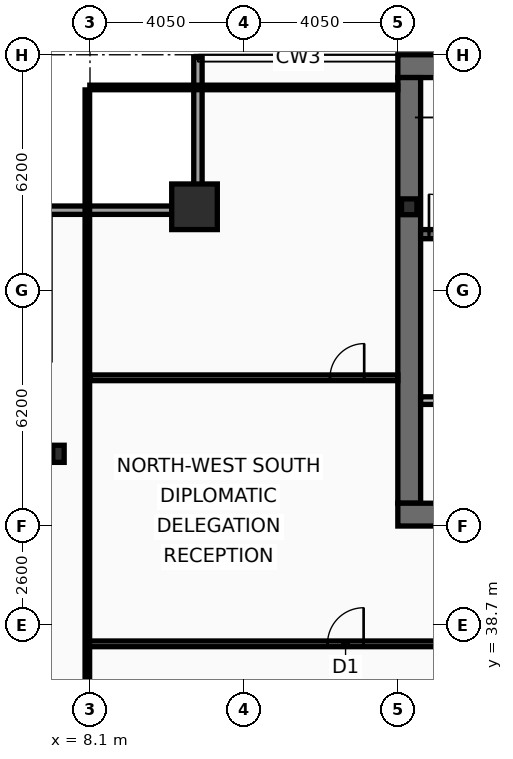
"""IFC4 building model, lengths in metres.
Left out: names, types, materials, properties, quantities, classifications, styles, units other than length and angle.
Written with IfcOpenShell. Run it as: python <this file> out.ifc"""

import sys

from ifc_helpers import new_model, si_unit, direction, frame, frame_2d, origin, origin_2d, place, context, subcontext, project, spatial, rectangle, hollow_rectangle, i_section, extrude, element, fill, save


model = new_model("IFC4")
c1 = context("Model", 3, precision=1e-05, world=origin(), true_north=direction((0.0, 1.0)))
c2 = subcontext(c1, "Body", "Model", "MODEL_VIEW")
j1 = project(units=[si_unit("LENGTHUNIT", "METRE"), si_unit("PLANEANGLEUNIT", "RADIAN")], contexts=[c1])
p1 = place(None, origin())
s1 = spatial("IfcSite", under=j1, at=p1, CompositionType="ELEMENT")
p2 = place(p1, origin())
s2 = spatial("IfcBuilding", under=s1, at=p2, CompositionType="ELEMENT")
p3 = place(p2, frame((0.0, 0.0, 206.6)))
s3 = spatial("IfcBuildingStorey", under=s2, at=p3, CompositionType="ELEMENT", Elevation=206.6)
p4 = place(p3, frame((16.2, 53.4, 0.0), z_axis=(0.0, 0.0, 1.0), x_axis=(1.0, 0.0, 0.0)))
e1 = element("IfcWall", 1, at=p4, inside=s3, PredefinedType="SHEAR", context=c2, shape_type="SweptSolid", body=[
    extrude(rectangle(XDim=40.5, YDim=0.6, at=frame_2d((20.25, 0.0))), origin(), (0.0, 0.0, 1.0), 3.44),
])
p5 = place(p3, frame((16.5, 41.9, 0.0), z_axis=(0.0, 0.0, 1.0), x_axis=(0.0, 1.0, 0.0)))
e2 = element("IfcWall", 2, at=p5, inside=s3, PredefinedType="SHEAR", context=c2, shape_type="SweptSolid", body=[
    extrude(rectangle(XDim=11.2, YDim=0.6, at=frame_2d((5.6, 0.0))), origin(), (0.0, 0.0, 1.0), 3.44),
])
p6 = place(p3, frame((18.65, 41.6, 0.0), z_axis=(0.0, 0.0, 1.0), x_axis=(-1.0, 0.0, 0.0)))
e3 = element("IfcWall", 3, at=p6, inside=s3, PredefinedType="SHEAR", context=c2, shape_type="SweptSolid", body=[
    extrude(rectangle(XDim=2.45, YDim=0.6, at=frame_2d((1.225, 0.0))), origin(), (0.0, 0.0, 1.0), 3.44),
])
p7 = place(p3, frame((16.8, 48.98, 0.0), z_axis=(0.0, 0.0, 1.0), x_axis=(1.0, 0.0, 0.0)))
e4 = element("IfcWall", 4, at=p7, inside=s3, PredefinedType="SHEAR", context=c2, shape_type="SweptSolid", body=[
    extrude(rectangle(XDim=7.42, YDim=0.24, at=frame_2d((3.71, 0.0))), origin(), (0.0, 0.0, 1.0), 3.44),
])
p8 = place(p7, frame((0.22, 0.0, 0.0)))
e5 = element("IfcOpeningElement", 5, at=p8, cuts=e4, PredefinedType="OPENING", context=c2, shape_type="SweptSolid", body=[
    extrude(rectangle(XDim=1.05, YDim=2.15, at=frame_2d((0.525, 1.075))), frame((0.0, 0.13, 0.0), z_axis=(0.0, -1.0, 0.0), x_axis=(1.0, 0.0, 0.0)), (0.0, 0.0, 1.0), 0.26),
])
p9 = place(p3, frame((10.85, 49.7, 0.0), z_axis=(0.0, 0.0, 1.0), x_axis=(1.0, 0.0, 0.0)))
e6 = element("IfcColumn", 6, at=p9, inside=s3, PredefinedType="COLUMN", context=c2, shape_type="SweptSolid", body=[
    extrude(hollow_rectangle(XDim=1.2, YDim=1.2, WallThickness=0.06, at=origin_2d()), origin(), (0.0, 0.0, 1.0), 3.6),
])
p10 = place(p3, frame((7.27, 43.2, 0.0), z_axis=(0.0, 0.0, 1.0), x_axis=(1.0, 0.0, 0.0)))
e7 = element("IfcColumn", 7, at=p10, inside=s3, PredefinedType="COLUMN", context=c2, shape_type="SweptSolid", body=[
    extrude(i_section(OverallWidth=0.3, OverallDepth=0.45, WebThickness=0.014, FlangeThickness=0.026, at=origin_2d()), origin(), (0.0, 0.0, 1.0), 3.6),
])
p11 = place(p3, frame((16.5, 49.7, 0.0), z_axis=(0.0, 0.0, 1.0), x_axis=(1.0, 0.0, 0.0)))
e8 = element("IfcColumn", 8, at=p11, inside=s3, PredefinedType="COLUMN", context=c2, shape_type="SweptSolid", body=[
    extrude(i_section(OverallWidth=0.406, OverallDepth=0.416, WebThickness=0.03, FlangeThickness=0.048, at=origin_2d()), origin(), (0.0, 0.0, 1.0), 3.6),
])
p12 = place(p3, frame((6.83, 49.61, 0.0), z_axis=(0.0, 0.0, 1.0), x_axis=(1.0, 0.0, 0.0)))
e9 = element("IfcWall", 9, at=p12, inside=s3, PredefinedType="SOLIDWALL", context=c2, shape_type="SweptSolid", body=[
    extrude(rectangle(XDim=4.22, YDim=0.22, at=frame_2d((2.11, 0.0))), origin(), (0.0, 0.0, 1.0), 2.83),
])
p13 = place(p3, frame((10.94, 49.72, 0.0), z_axis=(0.0, 0.0, 1.0), x_axis=(0.0, 1.0, 0.0)))
e10 = element("IfcWall", 10, at=p13, inside=s3, PredefinedType="SOLIDWALL", context=c2, shape_type="SweptSolid", body=[
    extrude(rectangle(XDim=3.91, YDim=0.22, at=frame_2d((1.955, 0.0))), origin(), (0.0, 0.0, 1.0), 2.83),
])
p14 = place(p3, frame((16.8, 44.6, 0.0), z_axis=(0.0, 0.0, 1.0), x_axis=(1.0, 0.0, 0.0)))
e11 = element("IfcWall", 11, at=p14, inside=s3, PredefinedType="PARTITIONING", context=c2, shape_type="SweptSolid", body=[
    extrude(rectangle(XDim=4.2, YDim=0.2, at=frame_2d((2.1, 0.0))), origin(), (0.0, 0.0, 1.0), 3.44),
])
p15 = place(p14, frame((1.25, 0.0, 0.0)))
e12 = element("IfcOpeningElement", 12, at=p15, cuts=e11, PredefinedType="OPENING", context=c2, shape_type="SweptSolid", body=[
    extrude(rectangle(XDim=1.05, YDim=2.15, at=frame_2d((0.525, 1.075))), frame((0.0, 0.11, 0.0), z_axis=(0.0, -1.0, 0.0), x_axis=(1.0, 0.0, 0.0)), (0.0, 0.0, 1.0), 0.22),
])
p16 = place(p3, frame((8.03, 38.2, 0.0), z_axis=(0.0, 0.0, 1.0), x_axis=(1.0, 0.0, 0.0)))
e13 = element("IfcWall", 13, at=p16, inside=s3, PredefinedType="PARTITIONING", context=c2, shape_type="SweptSolid", body=[
    extrude(rectangle(XDim=10.52, YDim=0.15, at=frame_2d((5.26, 0.0))), origin(), (0.0, 0.0, 1.0), 2.73),
])
p17 = place(p16, frame((6.32, 0.0, 0.0)))
e14 = element("IfcOpeningElement", 14, at=p17, cuts=e13, PredefinedType="OPENING", context=c2, shape_type="SweptSolid", body=[
    extrude(rectangle(XDim=0.95, YDim=2.05, at=frame_2d((0.475, 1.025))), frame((0.0, 0.085, 0.0), z_axis=(0.0, -1.0, 0.0), x_axis=(1.0, 0.0, 0.0)), (0.0, 0.0, 1.0), 0.17),
])
p18 = place(p3, frame((8.095, 45.2, 0.0), z_axis=(0.0, 0.0, 1.0), x_axis=(1.0, 0.0, 0.0)))
e15 = element("IfcWall", 15, at=p18, inside=s3, PredefinedType="PARTITIONING", context=c2, shape_type="SweptSolid", body=[
    extrude(rectangle(XDim=8.105, YDim=0.15, at=frame_2d((4.052, 0.0))), origin(), (0.0, 0.0, 1.0), 2.83),
])
p19 = place(p18, frame((6.32, 0.0, 0.0)))
e16 = element("IfcOpeningElement", 16, at=p19, cuts=e15, PredefinedType="OPENING", context=c2, shape_type="SweptSolid", body=[
    extrude(rectangle(XDim=0.9, YDim=2.05, at=frame_2d((0.45, 1.025))), frame((0.0, 0.085, 0.0), z_axis=(0.0, -1.0, 0.0), x_axis=(1.0, 0.0, 0.0)), (0.0, 0.0, 1.0), 0.17),
])
p20 = place(p3, frame((8.03, 10.665, 0.0), z_axis=(0.0, 0.0, 1.0), x_axis=(0.0, 1.0, 0.0)))
e17 = element("IfcWall", 17, at=p20, inside=s3, PredefinedType="PARTITIONING", context=c2, shape_type="SweptSolid", body=[
    extrude(rectangle(XDim=42.11, YDim=0.12, at=frame_2d((21.055, 0.0))), origin(), (0.0, 0.0, 1.0), 2.73),
])
p21 = place(p3, frame((8.095, 52.84, 0.0), z_axis=(0.0, 0.0, 1.0), x_axis=(1.0, 0.0, 0.0)))
e18 = element("IfcWall", 18, at=p21, inside=s3, PredefinedType="PARTITIONING", context=c2, shape_type="SweptSolid", body=[
    extrude(rectangle(XDim=8.105, YDim=0.12, at=frame_2d((4.052, 0.0))), origin(), (0.0, 0.0, 1.0), 3.44),
])
p22 = place(p8, origin())
e19 = element("IfcDoor", 19, at=p22, inside=s3, OperationType="SINGLE_SWING_LEFT", PredefinedType="DOOR", context=c2, shape_type="SweptSolid", body=[
    extrude(rectangle(XDim=1.05, YDim=2.15, at=frame_2d((0.525, 1.075))), frame((0.0, 0.025, 0.0), z_axis=(0.0, -1.0, 0.0), x_axis=(1.0, 0.0, 0.0)), (0.0, 0.0, 1.0), 0.05),
])
fill(e5, e19)
p23 = place(p17, origin())
e20 = element("IfcDoor", 20, at=p23, inside=s3, OperationType="SINGLE_SWING_RIGHT", PredefinedType="DOOR", context=c2, shape_type="SweptSolid", body=[
    extrude(rectangle(XDim=0.95, YDim=2.05, at=frame_2d((0.475, 1.025))), frame((0.0, 0.025, 0.0), z_axis=(0.0, -1.0, 0.0), x_axis=(1.0, 0.0, 0.0)), (0.0, 0.0, 1.0), 0.05),
])
fill(e14, e20)
p24 = place(p19, origin())
e21 = element("IfcDoor", 21, at=p24, inside=s3, OperationType="SINGLE_SWING_RIGHT", PredefinedType="DOOR", context=c2, shape_type="SweptSolid", body=[
    extrude(rectangle(XDim=0.9, YDim=2.05, at=frame_2d((0.45, 1.025))), frame((0.0, 0.025, 0.0), z_axis=(0.0, -1.0, 0.0), x_axis=(1.0, 0.0, 0.0)), (0.0, 0.0, 1.0), 0.05),
])
fill(e16, e21)
save(model, sys.argv[1])
